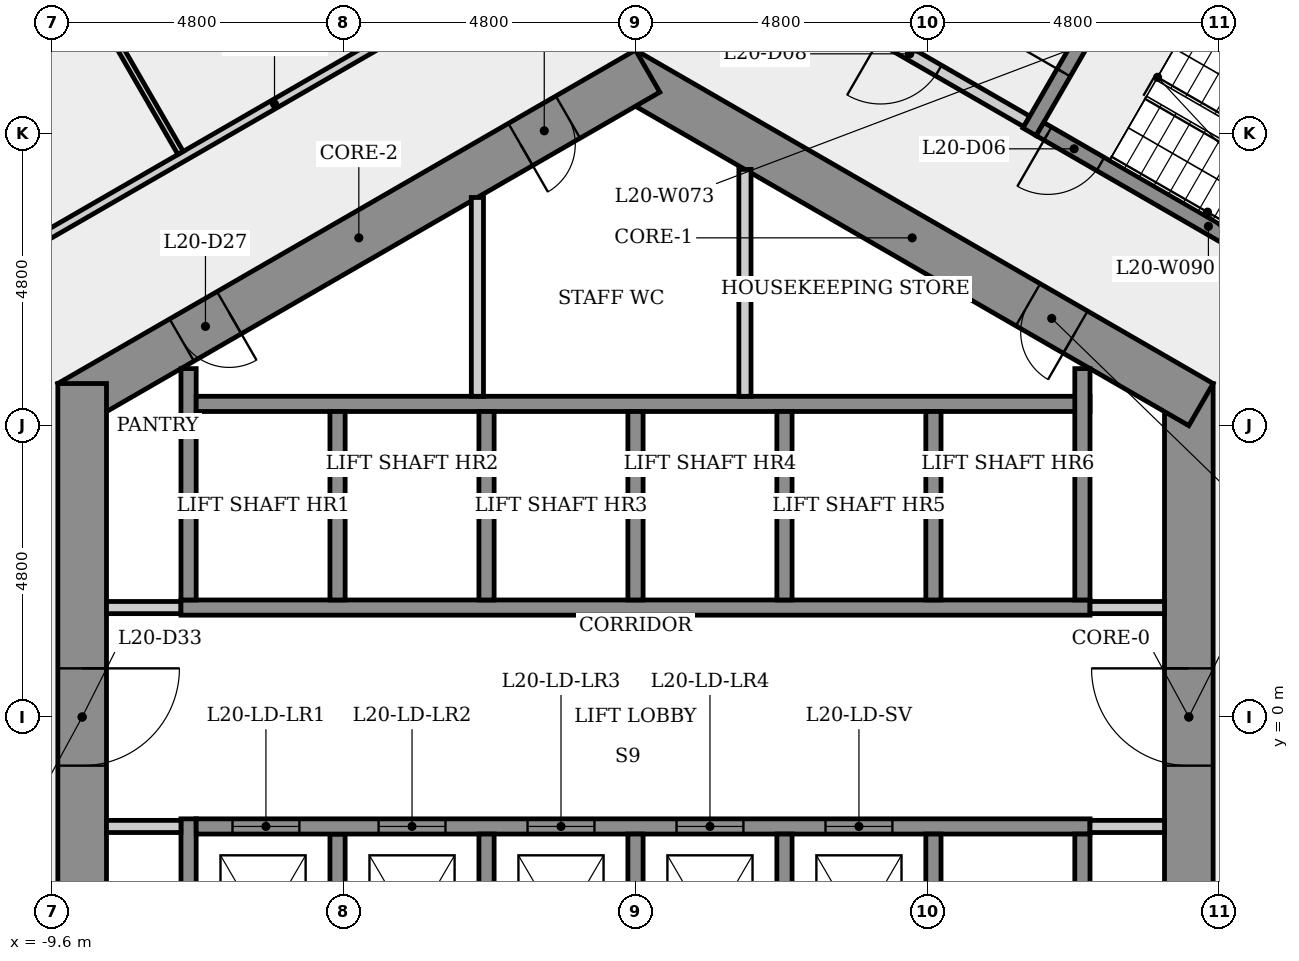
"""IFC4 building model, lengths in metres.
Left out: names, types, materials, properties, quantities, classifications, styles, units other than length and angle.
Written with IfcOpenShell. Run it as: python <this file> out.ifc"""

import sys

from ifc_helpers import new_model, si_unit, direction, frame, frame_2d, origin, place, context, subcontext, project, spatial, rectangle, extrude, element, fill, save


model = new_model("IFC4")
c1 = context("Model", 3, precision=1e-05, world=origin(), true_north=direction((0.0, 1.0)))
c2 = subcontext(c1, "Body", "Model", "MODEL_VIEW")
j1 = project(units=[si_unit("LENGTHUNIT", "METRE"), si_unit("PLANEANGLEUNIT", "RADIAN")], contexts=[c1])
p1 = place(None, origin())
s1 = spatial("IfcSite", under=j1, at=p1, CompositionType="ELEMENT")
p2 = place(p1, origin())
s2 = spatial("IfcBuilding", under=s1, at=p2, CompositionType="ELEMENT")
p3 = place(p2, frame((0.0, 0.0, 78.3)))
s3 = spatial("IfcBuildingStorey", under=s2, at=p3, CompositionType="ELEMENT", Elevation=78.3)
p4 = place(p3, frame((9.1, -5.485, 0.0), z_axis=(0.0, 0.0, 1.0), x_axis=(0.0, 1.0, 0.0)))
e1 = element("IfcWall", 1, at=p4, inside=s3, PredefinedType="SHEAR", context=c2, shape_type="SweptSolid", body=[
    extrude(rectangle(XDim=10.97, YDim=0.8, at=frame_2d((5.485, 0.0))), origin(), (0.0, 0.0, 1.0), 4.8),
])
p5 = place(p4, frame((4.685, 0.0, 0.0)))
e2 = element("IfcOpeningElement", 2, at=p5, cuts=e1, PredefinedType="OPENING", context=c2, shape_type="SweptSolid", body=[
    extrude(rectangle(XDim=1.6, YDim=2.1, at=frame_2d((0.8, 1.05))), frame((0.0, 0.41, 0.0), z_axis=(0.0, -1.0, 0.0), x_axis=(1.0, 0.0, 0.0)), (0.0, 0.0, 1.0), 0.82),
])
p6 = place(p3, frame((9.3, 5.138, 0.0), z_axis=(0.0, 0.0, 1.0), x_axis=(-0.866023993627, 0.500002442456, 0.0)))
e3 = element("IfcWall", 3, at=p6, inside=s3, PredefinedType="SHEAR", context=c2, shape_type="SweptSolid", body=[
    extrude(rectangle(XDim=10.97, YDim=0.8, at=frame_2d((5.485, 0.0))), origin(), (0.0, 0.0, 1.0), 4.8),
])
p7 = place(p6, frame((2.384, 0.0, 0.0)))
e4 = element("IfcOpeningElement", 4, at=p7, cuts=e3, PredefinedType="OPENING", context=c2, shape_type="SweptSolid", body=[
    extrude(rectangle(XDim=0.9, YDim=2.1, at=frame_2d((0.45, 1.05))), frame((0.0, 0.41, 0.0), z_axis=(0.0, -1.0, 0.0), x_axis=(1.0, 0.0, 0.0)), (0.0, 0.0, 1.0), 0.82),
])
p8 = place(p3, frame((0.2, 10.623, 0.0), z_axis=(0.0, 0.0, 1.0), x_axis=(-0.866023993627, -0.500002442456, 0.0)))
e5 = element("IfcWall", 5, at=p8, inside=s3, PredefinedType="SHEAR", context=c2, shape_type="SweptSolid", body=[
    extrude(rectangle(XDim=10.97, YDim=0.8, at=frame_2d((5.485, 0.0))), origin(), (0.0, 0.0, 1.0), 4.8),
])
p9 = place(p8, frame((7.947, 0.0, 0.0)))
e6 = element("IfcOpeningElement", 6, at=p9, cuts=e5, PredefinedType="OPENING", context=c2, shape_type="SweptSolid", body=[
    extrude(rectangle(XDim=0.9, YDim=2.1, at=frame_2d((0.45, 1.05))), frame((0.0, 0.41, 0.0), z_axis=(0.0, -1.0, 0.0), x_axis=(1.0, 0.0, 0.0)), (0.0, 0.0, 1.0), 0.82),
])
p10 = place(p8, frame((1.514, 0.0, 0.0)))
e7 = element("IfcOpeningElement", 7, at=p10, cuts=e5, PredefinedType="OPENING", context=c2, shape_type="SweptSolid", body=[
    extrude(rectangle(XDim=0.9, YDim=2.1, at=frame_2d((0.45, 1.05))), frame((0.0, 0.41, 0.0), z_axis=(0.0, -1.0, 0.0), x_axis=(1.0, 0.0, 0.0)), (0.0, 0.0, 1.0), 0.82),
])
p11 = place(p3, frame((-9.1, 5.485, 0.0), z_axis=(0.0, 0.0, 1.0), x_axis=(0.0, -1.0, 0.0)))
e8 = element("IfcWall", 8, at=p11, inside=s3, PredefinedType="SHEAR", context=c2, shape_type="SweptSolid", body=[
    extrude(rectangle(XDim=10.97, YDim=0.8, at=frame_2d((5.485, 0.0))), origin(), (0.0, 0.0, 1.0), 4.8),
])
p12 = place(p11, frame((4.685, 0.0, 0.0)))
e9 = element("IfcOpeningElement", 9, at=p12, cuts=e8, PredefinedType="OPENING", context=c2, shape_type="SweptSolid", body=[
    extrude(rectangle(XDim=1.6, YDim=2.1, at=frame_2d((0.8, 1.05))), frame((0.0, 0.41, 0.0), z_axis=(0.0, -1.0, 0.0), x_axis=(1.0, 0.0, 0.0)), (0.0, 0.0, 1.0), 0.82),
])
p13 = place(p3, frame((-10.567, 7.409, 0.0), z_axis=(0.0, 0.0, 1.0), x_axis=(0.866023253344, 0.500003724654, 0.0)))
e10 = element("IfcWall", 10, at=p13, inside=s3, PredefinedType="PARTITIONING", context=c2, shape_type="SweptSolid", body=[
    extrude(rectangle(XDim=10.694, YDim=0.15, at=frame_2d((5.347, 0.0))), origin(), (0.0, 0.0, 1.0), 4.45),
])
p14 = place(p3, frame((-8.7, 1.8, 0.0), z_axis=(0.0, 0.0, 1.0), x_axis=(1.0, 0.0, 0.0)))
e11 = element("IfcWall", 11, at=p14, inside=s3, PredefinedType="PARTITIONING", context=c2, shape_type="SweptSolid", body=[
    extrude(rectangle(XDim=1.225, YDim=0.2, at=frame_2d((0.613, 0.0))), origin(), (0.0, 0.0, 1.0), 4.45),
])
p15 = place(p3, frame((-7.482, 9.277, 0.0), z_axis=(0.0, 0.0, 1.0), x_axis=(-0.499989081013, 0.866031707772, 0.0)))
e12 = element("IfcWall", 12, at=p15, inside=s3, PredefinedType="PARTITIONING", context=c2, shape_type="SweptSolid", body=[
    extrude(rectangle(XDim=9.01, YDim=0.1, at=frame_2d((4.505, 0.0))), origin(), (0.0, 0.0, 1.0), 2.425),
])
p16 = place(p3, frame((-7.475, 1.8, 0.0), z_axis=(0.0, 0.0, 1.0), x_axis=(1.0, 0.0, 0.0)))
e13 = element("IfcWall", 13, at=p16, inside=s3, PredefinedType="SHEAR", context=c2, shape_type="SweptSolid", body=[
    extrude(rectangle(XDim=14.95, YDim=0.25, at=frame_2d((7.475, 0.0))), origin(), (0.0, 0.0, 1.0), 4.45),
])
p17 = place(p3, frame((-7.35, -5.73, 0.0), z_axis=(0.0, 0.0, 1.0), x_axis=(0.0, 1.0, 0.0)))
e14 = element("IfcWall", 14, at=p17, inside=s3, PredefinedType="SHEAR", context=c2, shape_type="SweptSolid", body=[
    extrude(rectangle(XDim=4.055, YDim=0.25, at=frame_2d((2.028, 0.0))), origin(), (0.0, 0.0, 1.0), 4.45),
])
p18 = place(p3, frame((-7.35, 1.925, 0.0), z_axis=(0.0, 0.0, 1.0), x_axis=(0.0, 1.0, 0.0)))
e15 = element("IfcWall", 15, at=p18, inside=s3, PredefinedType="SHEAR", context=c2, shape_type="SweptSolid", body=[
    extrude(rectangle(XDim=3.805, YDim=0.25, at=frame_2d((1.903, 0.0))), origin(), (0.0, 0.0, 1.0), 4.45),
])
p19 = place(p3, frame((-7.225, 5.15, 0.0), z_axis=(0.0, 0.0, 1.0), x_axis=(1.0, 0.0, 0.0)))
e16 = element("IfcWall", 16, at=p19, inside=s3, PredefinedType="SHEAR", context=c2, shape_type="SweptSolid", body=[
    extrude(rectangle(XDim=14.7, YDim=0.25, at=frame_2d((7.35, 0.0))), origin(), (0.0, 0.0, 1.0), 4.45),
])
p20 = place(p3, frame((-7.475, -1.8, 0.0), z_axis=(0.0, 0.0, 1.0), x_axis=(-1.0, 0.0, 0.0)))
e17 = element("IfcWall", 17, at=p20, inside=s3, PredefinedType="PARTITIONING", context=c2, shape_type="SweptSolid", body=[
    extrude(rectangle(XDim=1.225, YDim=0.2, at=frame_2d((0.613, 0.0))), origin(), (0.0, 0.0, 1.0), 4.45),
])
for number, where, z_axis, x_axis in (
    (18, (-4.9, -1.925, 0.0), (0.0, 0.0, 1.0), (0.0, -1.0, 0.0)),
    (19, (-4.9, 5.025, 0.0), (0.0, 0.0, 1.0), (0.0, -1.0, 0.0)),
):
    element("IfcWall", number, at=place(p3, frame(where, z_axis=z_axis, x_axis=x_axis)), inside=s3, PredefinedType="SHEAR", context=c2, shape_type="SweptSolid", body=[
        extrude(rectangle(XDim=3.1, YDim=0.25, at=frame_2d((1.55, 0.0))), origin(), (0.0, 0.0, 1.0), 4.8),
    ])
p21 = place(p3, frame((-7.225, -1.8, 0.0), z_axis=(0.0, 0.0, 1.0), x_axis=(1.0, 0.0, 0.0)))
e20 = element("IfcWall", 20, at=p21, inside=s3, PredefinedType="SHEAR", context=c2, shape_type="SweptSolid", body=[
    extrude(rectangle(XDim=14.7, YDim=0.25, at=frame_2d((7.35, 0.0))), origin(), (0.0, 0.0, 1.0), 4.45),
])
p22 = place(p21, frame((0.597, 0.0, 0.0)))
e21 = element("IfcOpeningElement", 21, at=p22, cuts=e20, PredefinedType="OPENING", context=c2, shape_type="SweptSolid", body=[
    extrude(rectangle(XDim=1.1, YDim=2.1, at=frame_2d((0.55, 1.05))), frame((0.0, 0.135, 0.0), z_axis=(0.0, -1.0, 0.0), x_axis=(1.0, 0.0, 0.0)), (0.0, 0.0, 1.0), 0.27),
])
p23 = place(p21, frame((3.0, 0.0, 0.0)))
e22 = element("IfcOpeningElement", 22, at=p23, cuts=e20, PredefinedType="OPENING", context=c2, shape_type="SweptSolid", body=[
    extrude(rectangle(XDim=1.1, YDim=2.1, at=frame_2d((0.55, 1.05))), frame((0.0, 0.135, 0.0), z_axis=(0.0, -1.0, 0.0), x_axis=(1.0, 0.0, 0.0)), (0.0, 0.0, 1.0), 0.27),
])
p24 = place(p21, frame((5.45, 0.0, 0.0)))
e23 = element("IfcOpeningElement", 23, at=p24, cuts=e20, PredefinedType="OPENING", context=c2, shape_type="SweptSolid", body=[
    extrude(rectangle(XDim=1.1, YDim=2.1, at=frame_2d((0.55, 1.05))), frame((0.0, 0.135, 0.0), z_axis=(0.0, -1.0, 0.0), x_axis=(1.0, 0.0, 0.0)), (0.0, 0.0, 1.0), 0.27),
])
p25 = place(p21, frame((7.9, 0.0, 0.0)))
e24 = element("IfcOpeningElement", 24, at=p25, cuts=e20, PredefinedType="OPENING", context=c2, shape_type="SweptSolid", body=[
    extrude(rectangle(XDim=1.1, YDim=2.1, at=frame_2d((0.55, 1.05))), frame((0.0, 0.135, 0.0), z_axis=(0.0, -1.0, 0.0), x_axis=(1.0, 0.0, 0.0)), (0.0, 0.0, 1.0), 0.27),
])
p26 = place(p21, frame((10.35, 0.0, 0.0)))
e25 = element("IfcOpeningElement", 25, at=p26, cuts=e20, PredefinedType="OPENING", context=c2, shape_type="SweptSolid", body=[
    extrude(rectangle(XDim=1.1, YDim=2.1, at=frame_2d((0.55, 1.05))), frame((0.0, 0.135, 0.0), z_axis=(0.0, -1.0, 0.0), x_axis=(1.0, 0.0, 0.0)), (0.0, 0.0, 1.0), 0.27),
])
p27 = place(p3, frame((-2.6, 8.545, 0.0), z_axis=(0.0, 0.0, 1.0), x_axis=(0.0, -1.0, 0.0)))
e26 = element("IfcWall", 26, at=p27, inside=s3, PredefinedType="PARTITIONING", context=c2, shape_type="SweptSolid", body=[
    extrude(rectangle(XDim=3.27, YDim=0.2, at=frame_2d((1.635, 0.0))), origin(), (0.0, 0.0, 1.0), 4.45),
])
for number, where, z_axis, x_axis in (
    (27, (-2.45, -1.925, 0.0), (0.0, 0.0, 1.0), (0.0, -1.0, 0.0)),
    (28, (-2.45, 5.025, 0.0), (0.0, 0.0, 1.0), (0.0, -1.0, 0.0)),
    (29, (0.0, -1.925, 0.0), (0.0, 0.0, 1.0), (0.0, -1.0, 0.0)),
    (30, (0.0, 5.025, 0.0), (0.0, 0.0, 1.0), (0.0, -1.0, 0.0)),
):
    element("IfcWall", number, at=place(p3, frame(where, z_axis=z_axis, x_axis=x_axis)), inside=s3, PredefinedType="SHEAR", context=c2, shape_type="SweptSolid", body=[
        extrude(rectangle(XDim=3.1, YDim=0.25, at=frame_2d((1.55, 0.0))), origin(), (0.0, 0.0, 1.0), 4.8),
    ])
p28 = place(p3, frame((1.8, 9.007, 0.0), z_axis=(0.0, 0.0, 1.0), x_axis=(0.0, -1.0, 0.0)))
e31 = element("IfcWall", 31, at=p28, inside=s3, PredefinedType="PARTITIONING", context=c2, shape_type="SweptSolid", body=[
    extrude(rectangle(XDim=3.732, YDim=0.2, at=frame_2d((1.866, 0.0))), origin(), (0.0, 0.0, 1.0), 4.45),
])
for number, where, z_axis, x_axis in (
    (32, (2.45, -1.925, 0.0), (0.0, 0.0, 1.0), (0.0, -1.0, 0.0)),
    (33, (2.45, 5.025, 0.0), (0.0, 0.0, 1.0), (0.0, -1.0, 0.0)),
    (34, (4.9, -1.925, 0.0), (0.0, 0.0, 1.0), (0.0, -1.0, 0.0)),
    (35, (4.9, 5.025, 0.0), (0.0, 0.0, 1.0), (0.0, -1.0, 0.0)),
):
    element("IfcWall", number, at=place(p3, frame(where, z_axis=z_axis, x_axis=x_axis)), inside=s3, PredefinedType="SHEAR", context=c2, shape_type="SweptSolid", body=[
        extrude(rectangle(XDim=3.1, YDim=0.25, at=frame_2d((1.55, 0.0))), origin(), (0.0, 0.0, 1.0), 4.8),
    ])
p29 = place(p3, frame((6.435, 9.795, 0.0), z_axis=(0.0, 0.0, 1.0), x_axis=(-0.866012907634, 0.500021643343, 0.0)))
e36 = element("IfcWall", 36, at=p29, inside=s3, PredefinedType="PARTITIONING", context=c2, shape_type="SweptSolid", body=[
    extrude(rectangle(XDim=4.45, YDim=0.2, at=frame_2d((2.225, 0.0))), origin(), (0.0, 0.0, 1.0), 4.45),
])
p30 = place(p29, frame((1.675, 0.0, 0.0)))
e37 = element("IfcOpeningElement", 37, at=p30, cuts=e36, PredefinedType="OPENING", context=c2, shape_type="SweptSolid", body=[
    extrude(rectangle(XDim=1.1, YDim=2.1, at=frame_2d((0.55, 1.05))), frame((0.0, 0.11, 0.0), z_axis=(0.0, -1.0, 0.0), x_axis=(1.0, 0.0, 0.0)), (0.0, 0.0, 1.0), 0.22),
])
p31 = place(p3, frame((6.48, 9.624, 0.0), z_axis=(0.0, 0.0, 1.0), x_axis=(0.500017246033, 0.866015446554, 0.0)))
e38 = element("IfcWall", 38, at=p31, inside=s3, PredefinedType="SHEAR", context=c2, shape_type="SweptSolid", body=[
    extrude(rectangle(XDim=3.25, YDim=0.25, at=frame_2d((1.625, 0.0))), origin(), (0.0, 0.0, 1.0), 4.45),
])
p32 = place(p31, frame((1.125, 0.0, 0.0)))
e39 = element("IfcOpeningElement", 39, at=p32, cuts=e38, PredefinedType="OPENING", context=c2, shape_type="SweptSolid", body=[
    extrude(rectangle(XDim=1.0, YDim=2.1, at=frame_2d((0.5, 1.05))), frame((0.0, 0.135, 0.0), z_axis=(0.0, -1.0, 0.0), x_axis=(1.0, 0.0, 0.0)), (0.0, 0.0, 1.0), 0.27),
])
p33 = place(p3, frame((7.475, 1.8, 0.0), z_axis=(0.0, 0.0, 1.0), x_axis=(1.0, 0.0, 0.0)))
e40 = element("IfcWall", 40, at=p33, inside=s3, PredefinedType="PARTITIONING", context=c2, shape_type="SweptSolid", body=[
    extrude(rectangle(XDim=1.225, YDim=0.2, at=frame_2d((0.613, 0.0))), origin(), (0.0, 0.0, 1.0), 4.45),
])
for number, where, z_axis, x_axis in (
    (41, (7.35, -1.925, 0.0), (0.0, 0.0, 1.0), (0.0, -1.0, 0.0)),
    (42, (7.35, 5.73, 0.0), (0.0, 0.0, 1.0), (0.0, -1.0, 0.0)),
):
    element("IfcWall", number, at=place(p3, frame(where, z_axis=z_axis, x_axis=x_axis)), inside=s3, PredefinedType="SHEAR", context=c2, shape_type="SweptSolid", body=[
        extrude(rectangle(XDim=3.805, YDim=0.25, at=frame_2d((1.903, 0.0))), origin(), (0.0, 0.0, 1.0), 4.45),
    ])
p34 = place(p3, frame((8.151, 12.268, 0.0), z_axis=(0.0, 0.0, 1.0), x_axis=(0.866025499775, -0.499999833739, 0.0)))
e43 = element("IfcWall", 43, at=p34, inside=s3, PredefinedType="SHEAR", context=c2, shape_type="SweptSolid", body=[
    extrude(rectangle(XDim=6.4, YDim=0.25, at=frame_2d((3.2, 0.0))), origin(), (0.0, 0.0, 1.0), 4.45),
])
p35 = place(p3, frame((8.7, -1.8, 0.0), z_axis=(0.0, 0.0, 1.0), x_axis=(-1.0, 0.0, 0.0)))
e44 = element("IfcWall", 44, at=p35, inside=s3, PredefinedType="PARTITIONING", context=c2, shape_type="SweptSolid", body=[
    extrude(rectangle(XDim=1.225, YDim=0.2, at=frame_2d((0.613, 0.0))), origin(), (0.0, 0.0, 1.0), 4.45),
])
p36 = place(p3, frame((12.194, 6.47, 0.0), z_axis=(0.0, 0.0, 1.0), x_axis=(-0.866025499775, 0.499999833739, 0.0)))
e45 = element("IfcWall", 45, at=p36, inside=s3, PredefinedType="SHEAR", context=c2, shape_type="SweptSolid", body=[
    extrude(rectangle(XDim=6.4, YDim=0.25, at=frame_2d((3.2, 0.0))), origin(), (0.0, 0.0, 1.0), 4.45),
])
p37 = place(p36, frame((5.25, 0.0, 0.0)))
e46 = element("IfcOpeningElement", 46, at=p37, cuts=e45, PredefinedType="OPENING", context=c2, shape_type="SweptSolid", body=[
    extrude(rectangle(XDim=1.0, YDim=2.1, at=frame_2d((0.5, 1.05))), frame((0.0, 0.135, 0.0), z_axis=(0.0, -1.0, 0.0), x_axis=(1.0, 0.0, 0.0)), (0.0, 0.0, 1.0), 0.27),
])
p38 = place(p22, origin())
e47 = element("IfcDoor", 47, at=p38, inside=s3, OperationType="SLIDING_TO_LEFT", PredefinedType="DOOR", context=c2, shape_type="SweptSolid", body=[
    extrude(rectangle(XDim=1.1, YDim=2.1, at=frame_2d((0.55, 1.05))), frame((0.0, 0.025, 0.0), z_axis=(0.0, -1.0, 0.0), x_axis=(1.0, 0.0, 0.0)), (0.0, 0.0, 1.0), 0.05),
])
fill(e21, e47)
p39 = place(p23, origin())
e48 = element("IfcDoor", 48, at=p39, inside=s3, OperationType="SLIDING_TO_LEFT", PredefinedType="DOOR", context=c2, shape_type="SweptSolid", body=[
    extrude(rectangle(XDim=1.1, YDim=2.1, at=frame_2d((0.55, 1.05))), frame((0.0, 0.025, 0.0), z_axis=(0.0, -1.0, 0.0), x_axis=(1.0, 0.0, 0.0)), (0.0, 0.0, 1.0), 0.05),
])
fill(e22, e48)
p40 = place(p24, origin())
e49 = element("IfcDoor", 49, at=p40, inside=s3, OperationType="SLIDING_TO_LEFT", PredefinedType="DOOR", context=c2, shape_type="SweptSolid", body=[
    extrude(rectangle(XDim=1.1, YDim=2.1, at=frame_2d((0.55, 1.05))), frame((0.0, 0.025, 0.0), z_axis=(0.0, -1.0, 0.0), x_axis=(1.0, 0.0, 0.0)), (0.0, 0.0, 1.0), 0.05),
])
fill(e23, e49)
p41 = place(p25, origin())
e50 = element("IfcDoor", 50, at=p41, inside=s3, OperationType="SLIDING_TO_LEFT", PredefinedType="DOOR", context=c2, shape_type="SweptSolid", body=[
    extrude(rectangle(XDim=1.1, YDim=2.1, at=frame_2d((0.55, 1.05))), frame((0.0, 0.025, 0.0), z_axis=(0.0, -1.0, 0.0), x_axis=(1.0, 0.0, 0.0)), (0.0, 0.0, 1.0), 0.05),
])
fill(e24, e50)
p42 = place(p26, origin())
e51 = element("IfcDoor", 51, at=p42, inside=s3, OperationType="SLIDING_TO_LEFT", PredefinedType="DOOR", context=c2, shape_type="SweptSolid", body=[
    extrude(rectangle(XDim=1.1, YDim=2.1, at=frame_2d((0.55, 1.05))), frame((0.0, 0.025, 0.0), z_axis=(0.0, -1.0, 0.0), x_axis=(1.0, 0.0, 0.0)), (0.0, 0.0, 1.0), 0.05),
])
fill(e25, e51)
p43 = place(p37, origin())
e52 = element("IfcDoor", 52, at=p43, inside=s3, OperationType="SINGLE_SWING_RIGHT", PredefinedType="DOOR", context=c2, shape_type="SweptSolid", body=[
    extrude(rectangle(XDim=1.0, YDim=2.1, at=frame_2d((0.5, 1.05))), frame((0.0, 0.025, 0.0), z_axis=(0.0, -1.0, 0.0), x_axis=(1.0, 0.0, 0.0)), (0.0, 0.0, 1.0), 0.05),
])
fill(e46, e52)
p44 = place(p32, origin())
e53 = element("IfcDoor", 53, at=p44, inside=s3, OperationType="SINGLE_SWING_LEFT", PredefinedType="DOOR", context=c2, shape_type="SweptSolid", body=[
    extrude(rectangle(XDim=1.0, YDim=2.1, at=frame_2d((0.5, 1.05))), frame((0.0, 0.025, 0.0), z_axis=(0.0, -1.0, 0.0), x_axis=(1.0, 0.0, 0.0)), (0.0, 0.0, 1.0), 0.05),
])
fill(e39, e53)
p45 = place(p30, origin())
e54 = element("IfcDoor", 54, at=p45, inside=s3, OperationType="SINGLE_SWING_RIGHT", PredefinedType="DOOR", context=c2, shape_type="SweptSolid", body=[
    extrude(rectangle(XDim=1.1, YDim=2.1, at=frame_2d((0.55, 1.05))), frame((0.0, 0.025, 0.0), z_axis=(0.0, -1.0, 0.0), x_axis=(1.0, 0.0, 0.0)), (0.0, 0.0, 1.0), 0.05),
])
fill(e37, e54)
p46 = place(p9, origin())
e55 = element("IfcDoor", 55, at=p46, inside=s3, OperationType="SINGLE_SWING_LEFT", PredefinedType="DOOR", context=c2, shape_type="SweptSolid", body=[
    extrude(rectangle(XDim=0.9, YDim=2.1, at=frame_2d((0.45, 1.05))), frame((0.0, 0.025, 0.0), z_axis=(0.0, -1.0, 0.0), x_axis=(1.0, 0.0, 0.0)), (0.0, 0.0, 1.0), 0.05),
])
fill(e6, e55)
p47 = place(p10, origin())
e56 = element("IfcDoor", 56, at=p47, inside=s3, OperationType="SINGLE_SWING_RIGHT", PredefinedType="DOOR", context=c2, shape_type="SweptSolid", body=[
    extrude(rectangle(XDim=0.9, YDim=2.1, at=frame_2d((0.45, 1.05))), frame((0.0, 0.025, 0.0), z_axis=(0.0, -1.0, 0.0), x_axis=(1.0, 0.0, 0.0)), (0.0, 0.0, 1.0), 0.05),
])
fill(e7, e56)
p48 = place(p7, origin())
e57 = element("IfcDoor", 57, at=p48, inside=s3, OperationType="SINGLE_SWING_LEFT", PredefinedType="DOOR", context=c2, shape_type="SweptSolid", body=[
    extrude(rectangle(XDim=0.9, YDim=2.1, at=frame_2d((0.45, 1.05))), frame((0.0, 0.025, 0.0), z_axis=(0.0, -1.0, 0.0), x_axis=(1.0, 0.0, 0.0)), (0.0, 0.0, 1.0), 0.05),
])
fill(e4, e57)
p49 = place(p5, origin())
e58 = element("IfcDoor", 58, at=p49, inside=s3, OperationType="SINGLE_SWING_RIGHT", PredefinedType="DOOR", context=c2, shape_type="SweptSolid", body=[
    extrude(rectangle(XDim=1.6, YDim=2.1, at=frame_2d((0.8, 1.05))), frame((0.0, 0.025, 0.0), z_axis=(0.0, -1.0, 0.0), x_axis=(1.0, 0.0, 0.0)), (0.0, 0.0, 1.0), 0.05),
])
fill(e2, e58)
p50 = place(p12, origin())
e59 = element("IfcDoor", 59, at=p50, inside=s3, OperationType="SINGLE_SWING_LEFT", PredefinedType="DOOR", context=c2, shape_type="SweptSolid", body=[
    extrude(rectangle(XDim=1.6, YDim=2.1, at=frame_2d((0.8, 1.05))), frame((0.0, 0.025, 0.0), z_axis=(0.0, -1.0, 0.0), x_axis=(1.0, 0.0, 0.0)), (0.0, 0.0, 1.0), 0.05),
])
fill(e9, e59)
save(model, sys.argv[1])
